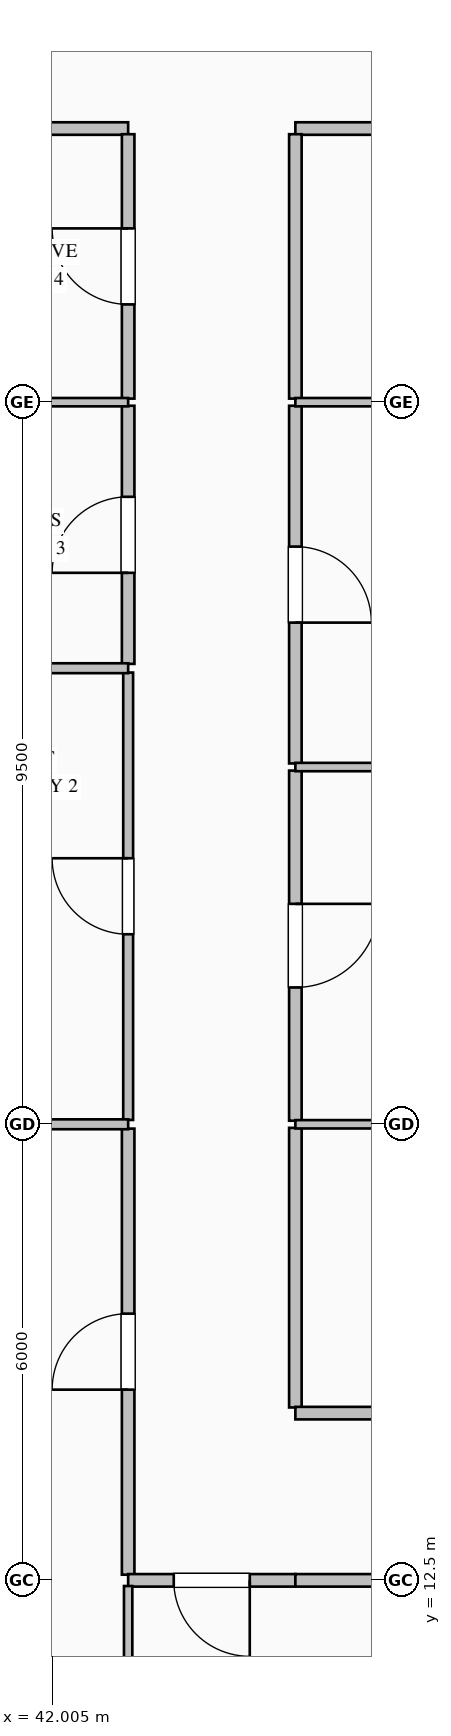
"""IFC4 building model, lengths in metres.
Left out: names, types, materials, properties, quantities, classifications, styles, units other than length and angle.
Written with IfcOpenShell. Run it as: python <this file> out.ifc"""

import sys

from ifc_helpers import new_model, si_unit, direction, frame, frame_2d, origin, place, context, subcontext, project, spatial, rectangle, extrude, element, fill, save


model = new_model("IFC4")
c1 = context("Model", 3, precision=1e-05, world=origin(), true_north=direction((0.0, 1.0)))
c2 = subcontext(c1, "Body", "Model", "MODEL_VIEW")
j1 = project(units=[si_unit("LENGTHUNIT", "METRE"), si_unit("PLANEANGLEUNIT", "RADIAN")], contexts=[c1])
p1 = place(None, origin())
s1 = spatial("IfcSite", under=j1, at=p1, CompositionType="ELEMENT")
p2 = place(p1, origin())
s2 = spatial("IfcBuilding", under=s1, at=p2, CompositionType="ELEMENT")
p3 = place(p2, frame((0.0, 0.0, 32.2)))
s3 = spatial("IfcBuildingStorey", under=s2, at=p3, CompositionType="ELEMENT", Elevation=32.2)
p4 = place(p3, frame((56.5, 31.6, 0.0), z_axis=(0.0, 0.0, 1.0), x_axis=(-1.0, 0.0, 0.0)))
e1 = element("IfcWall", 1, at=p4, inside=s3, PredefinedType="PARTITIONING", context=c2, shape_type="SweptSolid", body=[
    extrude(rectangle(XDim=11.3, YDim=0.165, at=frame_2d((5.65, 0.0))), origin(), (0.0, 0.0, 1.0), 3.75),
])
p5 = place(p4, frame((5.15, 0.0, 0.0)))
e2 = element("IfcOpeningElement", 2, at=p5, cuts=e1, PredefinedType="OPENING", context=c2, shape_type="SweptSolid", body=[
    extrude(rectangle(XDim=1.0, YDim=2.15, at=frame_2d((0.5, 1.075))), frame((0.0, 0.093, 0.0), z_axis=(0.0, -1.0, 0.0), x_axis=(1.0, 0.0, 0.0)), (0.0, 0.0, 1.0), 0.185),
])
p6 = place(p3, frame((43.0, 31.6, 0.0), z_axis=(0.0, 0.0, 1.0), x_axis=(-1.0, 0.0, 0.0)))
e3 = element("IfcWall", 3, at=p6, inside=s3, PredefinedType="PARTITIONING", context=c2, shape_type="SweptSolid", body=[
    extrude(rectangle(XDim=2.5, YDim=0.165, at=frame_2d((1.25, 0.0))), origin(), (0.0, 0.0, 1.0), 3.75),
])
p7 = place(p3, frame((45.2, 18.453, 0.0), z_axis=(0.0, 0.0, 1.0), x_axis=(0.0, -1.0, 0.0)))
e4 = element("IfcWall", 4, at=p7, inside=s3, PredefinedType="PARTITIONING", context=c2, shape_type="SweptSolid", body=[
    extrude(rectangle(XDim=3.678, YDim=0.165, at=frame_2d((1.839, 0.0))), origin(), (0.0, 0.0, 1.0), 3.75),
])
p8 = place(p3, frame((45.2, 23.153, 0.0), z_axis=(0.0, 0.0, 1.0), x_axis=(0.0, -1.0, 0.0)))
e5 = element("IfcWall", 5, at=p8, inside=s3, PredefinedType="PARTITIONING", context=c2, shape_type="SweptSolid", body=[
    extrude(rectangle(XDim=4.606, YDim=0.165, at=frame_2d((2.303, 0.0))), origin(), (0.0, 0.0, 1.0), 3.75),
])
p9 = place(p8, frame((1.753, 0.0, 0.0)))
e6 = element("IfcOpeningElement", 6, at=p9, cuts=e5, PredefinedType="OPENING", context=c2, shape_type="SweptSolid", body=[
    extrude(rectangle(XDim=1.1, YDim=2.2, at=frame_2d((0.55, 1.1))), frame((0.0, 0.093, 0.0), z_axis=(0.0, -1.0, 0.0), x_axis=(1.0, 0.0, 0.0)), (0.0, 0.0, 1.0), 0.185),
])
p10 = place(p3, frame((45.2, 27.953, 0.0), z_axis=(0.0, 0.0, 1.0), x_axis=(0.0, -1.0, 0.0)))
e7 = element("IfcWall", 7, at=p10, inside=s3, PredefinedType="PARTITIONING", context=c2, shape_type="SweptSolid", body=[
    extrude(rectangle(XDim=4.706, YDim=0.165, at=frame_2d((2.353, 0.0))), origin(), (0.0, 0.0, 1.0), 3.75),
])
p11 = place(p10, frame((1.853, 0.0, 0.0)))
e8 = element("IfcOpeningElement", 8, at=p11, cuts=e7, PredefinedType="OPENING", context=c2, shape_type="SweptSolid", body=[
    extrude(rectangle(XDim=1.0, YDim=2.15, at=frame_2d((0.5, 1.075))), frame((0.0, 0.093, 0.0), z_axis=(0.0, -1.0, 0.0), x_axis=(1.0, 0.0, 0.0)), (0.0, 0.0, 1.0), 0.185),
])
p12 = place(p3, frame((45.2, 31.525, 0.0), z_axis=(0.0, 0.0, 1.0), x_axis=(0.0, -1.0, 0.0)))
e9 = element("IfcWall", 9, at=p12, inside=s3, PredefinedType="PARTITIONING", context=c2, shape_type="SweptSolid", body=[
    extrude(rectangle(XDim=3.478, YDim=0.165, at=frame_2d((1.739, 0.0))), origin(), (0.0, 0.0, 1.0), 3.75),
])
p13 = place(p3, frame((43.0, 12.574, 0.0), z_axis=(0.0, 0.0, 1.0), x_axis=(0.0, 1.0, 0.0)))
e10 = element("IfcWall", 10, at=p13, inside=s3, PredefinedType="PARTITIONING", context=c2, shape_type="SweptSolid", body=[
    extrude(rectangle(XDim=5.869, YDim=0.165, at=frame_2d((2.934, 0.0))), origin(), (0.0, 0.0, 1.0), 3.75),
])
p14 = place(p13, frame((2.434, 0.0, 0.0)))
e11 = element("IfcOpeningElement", 11, at=p14, cuts=e10, PredefinedType="OPENING", context=c2, shape_type="SweptSolid", body=[
    extrude(rectangle(XDim=1.0, YDim=2.15, at=frame_2d((0.5, 1.075))), frame((0.0, 0.093, 0.0), z_axis=(0.0, -1.0, 0.0), x_axis=(1.0, 0.0, 0.0)), (0.0, 0.0, 1.0), 0.185),
])
p15 = place(p3, frame((43.0, 18.557, 0.0), z_axis=(0.0, 0.0, 1.0), x_axis=(0.0, 1.0, 0.0)))
e12 = element("IfcWall", 12, at=p15, inside=s3, PredefinedType="PARTITIONING", context=c2, shape_type="SweptSolid", body=[
    extrude(rectangle(XDim=5.886, YDim=0.13, at=frame_2d((2.943, 0.0))), origin(), (0.0, 0.0, 1.0), 3.75),
])
p16 = place(p15, frame((2.443, 0.0, 0.0)))
e13 = element("IfcOpeningElement", 13, at=p16, cuts=e12, PredefinedType="OPENING", context=c2, shape_type="SweptSolid", body=[
    extrude(rectangle(XDim=1.0, YDim=2.15, at=frame_2d((0.5, 1.075))), frame((0.0, 0.075, 0.0), z_axis=(0.0, -1.0, 0.0), x_axis=(1.0, 0.0, 0.0)), (0.0, 0.0, 1.0), 0.15),
])
p17 = place(p3, frame((43.0, 24.557, 0.0), z_axis=(0.0, 0.0, 1.0), x_axis=(0.0, 1.0, 0.0)))
e14 = element("IfcWall", 14, at=p17, inside=s3, PredefinedType="PARTITIONING", context=c2, shape_type="SweptSolid", body=[
    extrude(rectangle(XDim=3.396, YDim=0.165, at=frame_2d((1.698, 0.0))), origin(), (0.0, 0.0, 1.0), 3.75),
])
p18 = place(p17, frame((1.198, 0.0, 0.0)))
e15 = element("IfcOpeningElement", 15, at=p18, cuts=e14, PredefinedType="OPENING", context=c2, shape_type="SweptSolid", body=[
    extrude(rectangle(XDim=1.0, YDim=2.15, at=frame_2d((0.5, 1.075))), frame((0.0, 0.093, 0.0), z_axis=(0.0, -1.0, 0.0), x_axis=(1.0, 0.0, 0.0)), (0.0, 0.0, 1.0), 0.185),
])
p19 = place(p3, frame((43.0, 28.047, 0.0), z_axis=(0.0, 0.0, 1.0), x_axis=(0.0, 1.0, 0.0)))
e16 = element("IfcWall", 16, at=p19, inside=s3, PredefinedType="PARTITIONING", context=c2, shape_type="SweptSolid", body=[
    extrude(rectangle(XDim=3.478, YDim=0.165, at=frame_2d((1.739, 0.0))), origin(), (0.0, 0.0, 1.0), 3.75),
])
p20 = place(p19, frame((1.239, 0.0, 0.0)))
e17 = element("IfcOpeningElement", 17, at=p20, cuts=e16, PredefinedType="OPENING", context=c2, shape_type="SweptSolid", body=[
    extrude(rectangle(XDim=1.0, YDim=2.15, at=frame_2d((0.5, 1.075))), frame((0.0, 0.093, 0.0), z_axis=(0.0, -1.0, 0.0), x_axis=(1.0, 0.0, 0.0)), (0.0, 0.0, 1.0), 0.185),
])
p21 = place(p3, frame((45.2, 12.5, 0.0), z_axis=(0.0, 0.0, 1.0), x_axis=(-1.0, 0.0, 0.0)))
e18 = element("IfcWall", 18, at=p21, inside=s3, PredefinedType="PARTITIONING", context=c2, shape_type="SweptSolid", body=[
    extrude(rectangle(XDim=2.2, YDim=0.165, at=frame_2d((1.1, 0.0))), origin(), (0.0, 0.0, 1.0), 3.042),
])
p22 = place(p21, frame((0.6, 0.0, 0.0)))
e19 = element("IfcOpeningElement", 19, at=p22, cuts=e18, PredefinedType="OPENING", context=c2, shape_type="SweptSolid", body=[
    extrude(rectangle(XDim=1.0, YDim=2.15, at=frame_2d((0.5, 1.075))), frame((0.0, 0.093, 0.0), z_axis=(0.0, -1.0, 0.0), x_axis=(1.0, 0.0, 0.0)), (0.0, 0.0, 1.0), 0.185),
])
p23 = place(p3, frame((45.2, 14.7, 0.0), z_axis=(0.0, 0.0, 1.0), x_axis=(1.0, 0.0, 0.0)))
e20 = element("IfcWall", 20, at=p23, inside=s3, PredefinedType="PARTITIONING", context=c2, shape_type="SweptSolid", body=[
    extrude(rectangle(XDim=16.3, YDim=0.165, at=frame_2d((8.15, 0.0))), origin(), (0.0, 0.0, 1.0), 3.75),
])
p24 = place(p23, frame((7.65, 0.0, 0.0)))
e21 = element("IfcOpeningElement", 21, at=p24, cuts=e20, PredefinedType="OPENING", context=c2, shape_type="SweptSolid", body=[
    extrude(rectangle(XDim=1.0, YDim=2.15, at=frame_2d((0.5, 1.075))), frame((0.0, 0.093, 0.0), z_axis=(0.0, -1.0, 0.0), x_axis=(1.0, 0.0, 0.0)), (0.0, 0.0, 1.0), 0.185),
])
p25 = place(p3, frame((46.5, 12.5, 0.0), z_axis=(0.0, 0.0, 1.0), x_axis=(-1.0, 0.0, 0.0)))
e22 = element("IfcWall", 22, at=p25, inside=s3, PredefinedType="PARTITIONING", context=c2, shape_type="SweptSolid", body=[
    extrude(rectangle(XDim=1.3, YDim=0.165, at=frame_2d((0.65, 0.0))), origin(), (0.0, 0.0, 1.0), 3.042),
])
p26 = place(p3, frame((45.2, 18.5, 0.0), z_axis=(0.0, 0.0, 1.0), x_axis=(1.0, 0.0, 0.0)))
e23 = element("IfcWall", 23, at=p26, inside=s3, PredefinedType="MOVABLE", context=c2, shape_type="SweptSolid", body=[
    extrude(rectangle(XDim=18.448, YDim=0.11, at=frame_2d((9.224, 0.0))), origin(), (0.0, 0.0, 1.0), 3.042),
])
p27 = place(p3, frame((45.2, 23.2, 0.0), z_axis=(0.0, 0.0, 1.0), x_axis=(1.0, 0.0, 0.0)))
e24 = element("IfcWall", 24, at=p27, inside=s3, PredefinedType="MOVABLE", context=c2, shape_type="SweptSolid", body=[
    extrude(rectangle(XDim=18.448, YDim=0.11, at=frame_2d((9.224, 0.0))), origin(), (0.0, 0.0, 1.0), 3.342),
])
p28 = place(p3, frame((45.2, 28.0, 0.0), z_axis=(0.0, 0.0, 1.0), x_axis=(1.0, 0.0, 0.0)))
e25 = element("IfcWall", 25, at=p28, inside=s3, PredefinedType="MOVABLE", context=c2, shape_type="SweptSolid", body=[
    extrude(rectangle(XDim=18.448, YDim=0.11, at=frame_2d((9.224, 0.0))), origin(), (0.0, 0.0, 1.0), 3.042),
])
p29 = place(p3, frame((40.852, 18.5, 0.0), z_axis=(0.0, 0.0, 1.0), x_axis=(1.0, 0.0, 0.0)))
e26 = element("IfcWall", 26, at=p29, inside=s3, PredefinedType="PARTITIONING", context=c2, shape_type="SweptSolid", body=[
    extrude(rectangle(XDim=2.148, YDim=0.13, at=frame_2d((1.074, 0.0))), origin(), (0.0, 0.0, 1.0), 3.042),
])
p30 = place(p3, frame((43.0, 12.426, 0.0), z_axis=(0.0, 0.0, 1.0), x_axis=(0.0, -1.0, 0.0)))
e27 = element("IfcWall", 27, at=p30, inside=s3, PredefinedType="MOVABLE", context=c2, shape_type="SweptSolid", body=[
    extrude(rectangle(XDim=6.428, YDim=0.11, at=frame_2d((3.214, 0.0))), origin(), (0.0, 0.0, 1.0), 3.75),
])
p31 = place(p3, frame((40.852, 24.5, 0.0), z_axis=(0.0, 0.0, 1.0), x_axis=(1.0, 0.0, 0.0)))
e28 = element("IfcWall", 28, at=p31, inside=s3, PredefinedType="PARTITIONING", context=c2, shape_type="SweptSolid", body=[
    extrude(rectangle(XDim=2.148, YDim=0.13, at=frame_2d((1.074, 0.0))), origin(), (0.0, 0.0, 1.0), 3.75),
])
p32 = place(p3, frame((40.852, 28.0, 0.0), z_axis=(0.0, 0.0, 1.0), x_axis=(1.0, 0.0, 0.0)))
e29 = element("IfcWall", 29, at=p32, inside=s3, PredefinedType="MOVABLE", context=c2, shape_type="SweptSolid", body=[
    extrude(rectangle(XDim=2.148, YDim=0.11, at=frame_2d((1.074, 0.0))), origin(), (0.0, 0.0, 1.0), 3.042),
])
p33 = place(p9, origin())
e30 = element("IfcDoor", 30, at=p33, inside=s3, OperationType="SINGLE_SWING_LEFT", PredefinedType="DOOR", context=c2, shape_type="SweptSolid", body=[
    extrude(rectangle(XDim=1.1, YDim=2.2, at=frame_2d((0.55, 1.1))), frame((0.0, 0.025, 0.0), z_axis=(0.0, -1.0, 0.0), x_axis=(1.0, 0.0, 0.0)), (0.0, 0.0, 1.0), 0.05),
])
fill(e6, e30)
p34 = place(p11, origin())
e31 = element("IfcDoor", 31, at=p34, inside=s3, OperationType="SINGLE_SWING_RIGHT", PredefinedType="DOOR", context=c2, shape_type="SweptSolid", body=[
    extrude(rectangle(XDim=1.0, YDim=2.15, at=frame_2d((0.5, 1.075))), frame((0.0, 0.025, 0.0), z_axis=(0.0, -1.0, 0.0), x_axis=(1.0, 0.0, 0.0)), (0.0, 0.0, 1.0), 0.05),
])
fill(e8, e31)
p35 = place(p14, origin())
e32 = element("IfcDoor", 32, at=p35, inside=s3, OperationType="SINGLE_SWING_LEFT", PredefinedType="DOOR", context=c2, shape_type="SweptSolid", body=[
    extrude(rectangle(XDim=1.0, YDim=2.15, at=frame_2d((0.5, 1.075))), frame((0.0, 0.025, 0.0), z_axis=(0.0, -1.0, 0.0), x_axis=(1.0, 0.0, 0.0)), (0.0, 0.0, 1.0), 0.05),
])
fill(e11, e32)
p36 = place(p16, origin())
e33 = element("IfcDoor", 33, at=p36, inside=s3, OperationType="SINGLE_SWING_RIGHT", PredefinedType="DOOR", context=c2, shape_type="SweptSolid", body=[
    extrude(rectangle(XDim=1.0, YDim=2.15, at=frame_2d((0.5, 1.075))), frame((0.0, 0.025, 0.0), z_axis=(0.0, -1.0, 0.0), x_axis=(1.0, 0.0, 0.0)), (0.0, 0.0, 1.0), 0.05),
])
fill(e13, e33)
p37 = place(p18, origin())
e34 = element("IfcDoor", 34, at=p37, inside=s3, OperationType="SINGLE_SWING_LEFT", PredefinedType="DOOR", context=c2, shape_type="SweptSolid", body=[
    extrude(rectangle(XDim=1.0, YDim=2.15, at=frame_2d((0.5, 1.075))), frame((0.0, 0.025, 0.0), z_axis=(0.0, -1.0, 0.0), x_axis=(1.0, 0.0, 0.0)), (0.0, 0.0, 1.0), 0.05),
])
fill(e15, e34)
p38 = place(p20, origin())
e35 = element("IfcDoor", 35, at=p38, inside=s3, OperationType="SINGLE_SWING_RIGHT", PredefinedType="DOOR", context=c2, shape_type="SweptSolid", body=[
    extrude(rectangle(XDim=1.0, YDim=2.15, at=frame_2d((0.5, 1.075))), frame((0.0, 0.025, 0.0), z_axis=(0.0, -1.0, 0.0), x_axis=(1.0, 0.0, 0.0)), (0.0, 0.0, 1.0), 0.05),
])
fill(e17, e35)
p39 = place(p22, origin())
e36 = element("IfcDoor", 36, at=p39, inside=s3, OperationType="SINGLE_SWING_LEFT", PredefinedType="DOOR", context=c2, shape_type="SweptSolid", body=[
    extrude(rectangle(XDim=1.0, YDim=2.15, at=frame_2d((0.5, 1.075))), frame((0.0, 0.025, 0.0), z_axis=(0.0, -1.0, 0.0), x_axis=(1.0, 0.0, 0.0)), (0.0, 0.0, 1.0), 0.05),
])
fill(e19, e36)
save(model, sys.argv[1])
